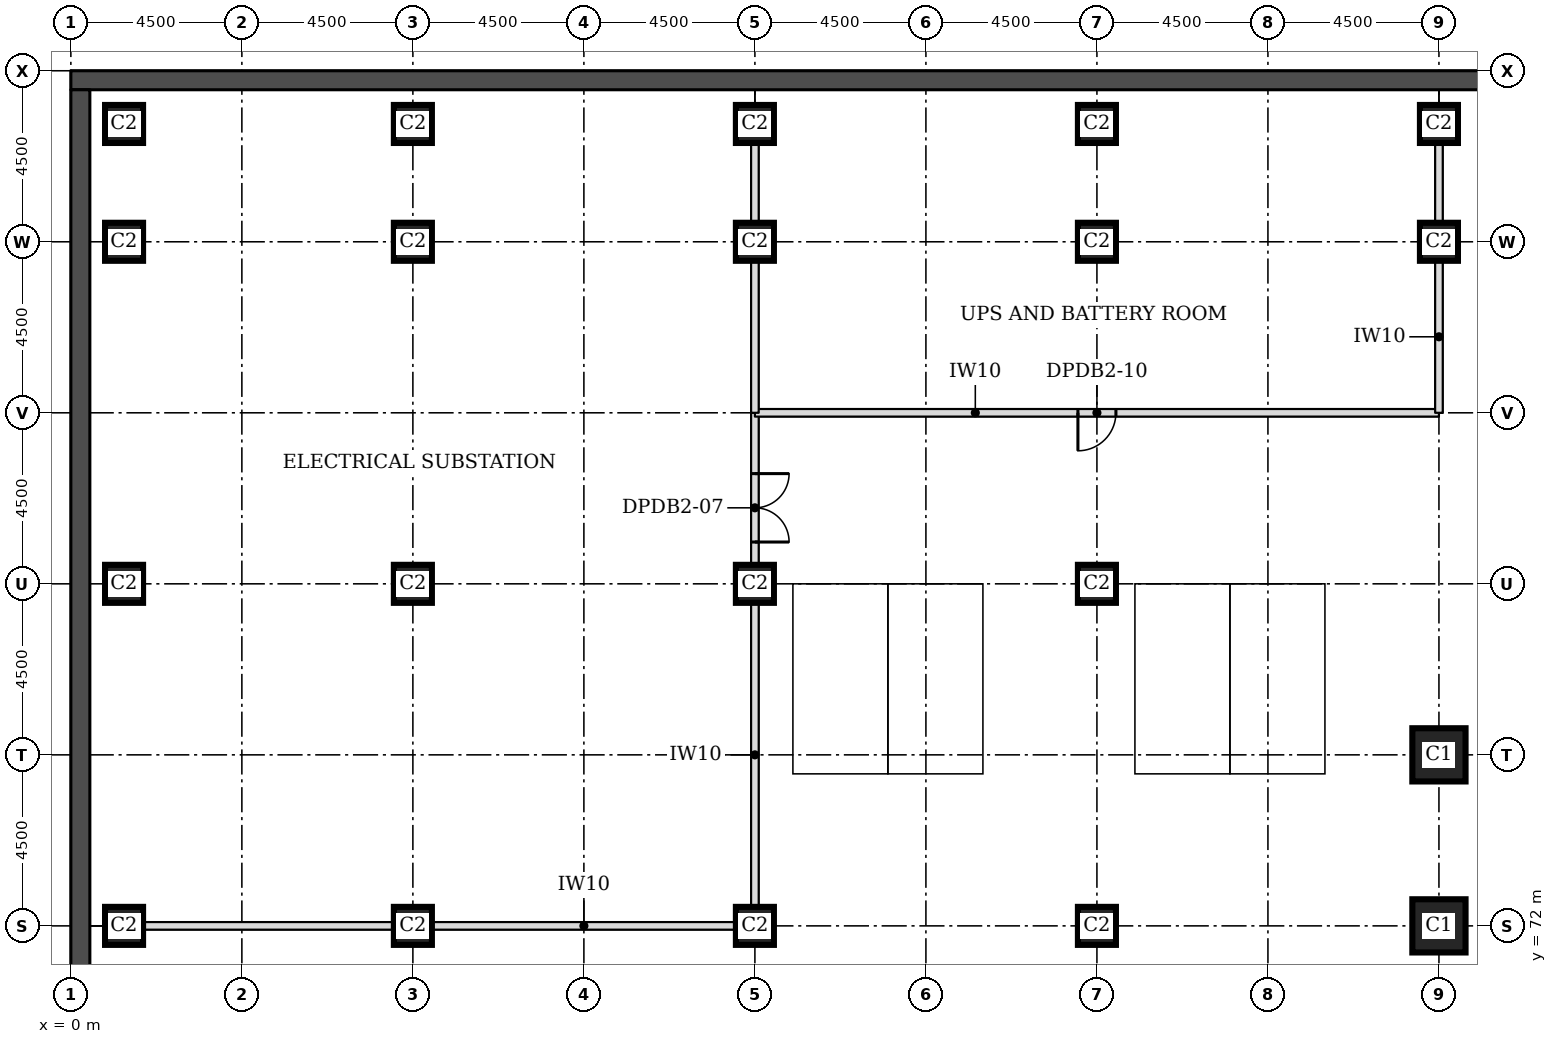
"""IFC4 building model, lengths in metres.
Left out: names, types, materials, properties, quantities, classifications, styles, units other than length and angle.
Written with IfcOpenShell. Run it as: python <this file> out.ifc"""

import sys

from ifc_helpers import new_model, si_unit, direction, frame, frame_2d, origin, origin_2d, place, context, subcontext, project, spatial, rectangle, extrude, element, fill, save


model = new_model("IFC4")
c1 = context("Model", 3, precision=1e-05, world=origin(), true_north=direction((0.0, 1.0)))
c2 = subcontext(c1, "Body", "Model", "MODEL_VIEW")
j1 = project(units=[si_unit("LENGTHUNIT", "METRE"), si_unit("PLANEANGLEUNIT", "RADIAN")], contexts=[c1])
p1 = place(None, origin())
s1 = spatial("IfcSite", under=j1, at=p1, CompositionType="ELEMENT")
p2 = place(p1, origin())
s2 = spatial("IfcBuilding", under=s1, at=p2, CompositionType="ELEMENT")
p3 = place(p2, frame((0.0, 0.0, -9.0)))
s3 = spatial("IfcBuildingStorey", under=s2, at=p3, CompositionType="ELEMENT", Elevation=-9.0)
p4 = place(p3, frame((0.0, 94.25, -0.4), z_axis=(0.0, 0.0, 1.0), x_axis=(1.0, 0.0, 0.0)))
e1 = element("IfcWall", 1, at=p4, inside=s3, PredefinedType="SOLIDWALL", context=c2, shape_type="SweptSolid", body=[
    extrude(rectangle(XDim=99.0, YDim=0.5, at=frame_2d((49.5, 0.0))), origin(), (0.0, 0.0, 1.0), 4.5),
])
p5 = place(p3, frame((0.25, 0.5, -0.4), z_axis=(0.0, 0.0, 1.0), x_axis=(0.0, 1.0, 0.0)))
e2 = element("IfcWall", 2, at=p5, inside=s3, PredefinedType="SOLIDWALL", context=c2, shape_type="SweptSolid", body=[
    extrude(rectangle(XDim=93.5, YDim=0.5, at=frame_2d((46.75, 0.0))), origin(), (0.0, 0.0, 1.0), 4.5),
])
for number, where, z_axis, x_axis in (
    (3, (36.0, 72.0, 0.0), (0.0, 0.0, 1.0), (1.0, 0.0, 0.0)),
    (4, (36.0, 76.5, 0.0), (0.0, 0.0, 1.0), (1.0, 0.0, 0.0)),
):
    element("IfcColumn", number, at=place(p3, frame(where, z_axis=z_axis, x_axis=x_axis)), inside=s3, PredefinedType="COLUMN", context=c2, shape_type="SweptSolid", body=[
        extrude(rectangle(XDim=1.4, YDim=1.4, at=origin_2d()), origin(), (0.0, 0.0, 1.0), 4.5),
    ])
for number, where, z_axis, x_axis in (
    (5, (9.0, 72.0, -0.4), (0.0, 0.0, 1.0), (1.0, 0.0, 0.0)),
    (6, (9.0, 81.0, -0.4), (0.0, 0.0, 1.0), (1.0, 0.0, 0.0)),
    (7, (9.0, 90.0, -0.4), (0.0, 0.0, 1.0), (1.0, 0.0, 0.0)),
    (8, (18.0, 72.0, -0.4), (0.0, 0.0, 1.0), (1.0, 0.0, 0.0)),
    (9, (18.0, 81.0, -0.4), (0.0, 0.0, 1.0), (1.0, 0.0, 0.0)),
    (10, (18.0, 90.0, -0.4), (0.0, 0.0, 1.0), (1.0, 0.0, 0.0)),
    (11, (27.0, 72.0, -0.4), (0.0, 0.0, 1.0), (1.0, 0.0, 0.0)),
    (12, (27.0, 81.0, -0.4), (0.0, 0.0, 1.0), (1.0, 0.0, 0.0)),
    (13, (27.0, 90.0, -0.4), (0.0, 0.0, 1.0), (1.0, 0.0, 0.0)),
    (14, (36.0, 90.0, -0.4), (0.0, 0.0, 1.0), (1.0, 0.0, 0.0)),
    (15, (1.4, 72.0, -0.4), (0.0, 0.0, 1.0), (1.0, 0.0, 0.0)),
    (16, (1.4, 81.0, -0.4), (0.0, 0.0, 1.0), (1.0, 0.0, 0.0)),
    (17, (1.4, 90.0, -0.4), (0.0, 0.0, 1.0), (1.0, 0.0, 0.0)),
    (18, (1.4, 93.1, -0.4), (0.0, 0.0, 1.0), (1.0, 0.0, 0.0)),
    (19, (9.0, 93.1, -0.4), (0.0, 0.0, 1.0), (1.0, 0.0, 0.0)),
    (20, (18.0, 93.1, -0.4), (0.0, 0.0, 1.0), (1.0, 0.0, 0.0)),
    (21, (27.0, 93.1, -0.4), (0.0, 0.0, 1.0), (1.0, 0.0, 0.0)),
    (22, (36.0, 93.1, -0.4), (0.0, 0.0, 1.0), (1.0, 0.0, 0.0)),
):
    element("IfcColumn", number, at=place(p3, frame(where, z_axis=z_axis, x_axis=x_axis)), inside=s3, PredefinedType="COLUMN", context=c2, shape_type="SweptSolid", body=[
        extrude(rectangle(XDim=1.0, YDim=1.0, at=origin_2d()), origin(), (0.0, 0.0, 1.0), 4.9),
    ])
p6 = place(p3, frame((1.9, 72.0, 0.0), z_axis=(0.0, 0.0, 1.0), x_axis=(1.0, 0.0, 0.0)))
e23 = element("IfcWall", 23, at=p6, inside=s3, PredefinedType="PARTITIONING", context=c2, shape_type="SweptSolid", body=[
    extrude(rectangle(XDim=6.6, YDim=0.2, at=frame_2d((3.3, 0.0))), origin(), (0.0, 0.0, 1.0), 4.1),
])
for number, where, z_axis, x_axis in (
    (24, (9.5, 72.0, 0.0), (0.0, 0.0, 1.0), (1.0, 0.0, 0.0)),
    (25, (18.0, 72.5, 0.0), (0.0, 0.0, 1.0), (0.0, 1.0, 0.0)),
):
    element("IfcWall", number, at=place(p3, frame(where, z_axis=z_axis, x_axis=x_axis)), inside=s3, PredefinedType="PARTITIONING", context=c2, shape_type="SweptSolid", body=[
        extrude(rectangle(XDim=8.0, YDim=0.2, at=frame_2d((4.0, 0.0))), origin(), (0.0, 0.0, 1.0), 4.1),
    ])
p7 = place(p3, frame((18.0, 81.5, 0.0), z_axis=(0.0, 0.0, 1.0), x_axis=(0.0, 1.0, 0.0)))
e26 = element("IfcWall", 26, at=p7, inside=s3, PredefinedType="PARTITIONING", context=c2, shape_type="SweptSolid", body=[
    extrude(rectangle(XDim=4.0, YDim=0.2, at=frame_2d((2.0, 0.0))), origin(), (0.0, 0.0, 1.0), 4.1),
])
p8 = place(p7, frame((0.6, 0.0, 0.0)))
e27 = element("IfcOpeningElement", 27, at=p8, cuts=e26, PredefinedType="OPENING", context=c2, shape_type="SweptSolid", body=[
    extrude(rectangle(XDim=1.8, YDim=2.1, at=frame_2d((0.9, 1.05))), frame((0.0, 0.11, 0.0), z_axis=(0.0, -1.0, 0.0), x_axis=(1.0, 0.0, 0.0)), (0.0, 0.0, 1.0), 0.22),
])
p9 = place(p3, frame((18.0, 85.5, 0.0), z_axis=(0.0, 0.0, 1.0), x_axis=(1.0, 0.0, 0.0)))
e28 = element("IfcWall", 28, at=p9, inside=s3, PredefinedType="PARTITIONING", context=c2, shape_type="SweptSolid", body=[
    extrude(rectangle(XDim=18.0, YDim=0.2, at=frame_2d((9.0, 0.0))), origin(), (0.0, 0.0, 1.0), 4.1),
])
p10 = place(p9, frame((8.5, 0.0, 0.0)))
e29 = element("IfcOpeningElement", 29, at=p10, cuts=e28, PredefinedType="OPENING", context=c2, shape_type="SweptSolid", body=[
    extrude(rectangle(XDim=1.0, YDim=2.1, at=frame_2d((0.5, 1.05))), frame((0.0, 0.11, 0.0), z_axis=(0.0, -1.0, 0.0), x_axis=(1.0, 0.0, 0.0)), (0.0, 0.0, 1.0), 0.22),
])
p11 = place(p3, frame((18.0, 85.5, 0.0), z_axis=(0.0, 0.0, 1.0), x_axis=(0.0, 1.0, 0.0)))
e30 = element("IfcWall", 30, at=p11, inside=s3, PredefinedType="PARTITIONING", context=c2, shape_type="SweptSolid", body=[
    extrude(rectangle(XDim=4.0, YDim=0.2, at=frame_2d((2.0, 0.0))), origin(), (0.0, 0.0, 1.0), 4.1),
])
p12 = place(p3, frame((18.0, 90.5, 0.0), z_axis=(0.0, 0.0, 1.0), x_axis=(0.0, 1.0, 0.0)))
e31 = element("IfcWall", 31, at=p12, inside=s3, PredefinedType="PARTITIONING", context=c2, shape_type="SweptSolid", body=[
    extrude(rectangle(XDim=2.1, YDim=0.2, at=frame_2d((1.05, 0.0))), origin(), (0.0, 0.0, 1.0), 4.1),
])
p13 = place(p3, frame((36.0, 85.5, 0.0), z_axis=(0.0, 0.0, 1.0), x_axis=(0.0, 1.0, 0.0)))
e32 = element("IfcWall", 32, at=p13, inside=s3, PredefinedType="PARTITIONING", context=c2, shape_type="SweptSolid", body=[
    extrude(rectangle(XDim=4.0, YDim=0.2, at=frame_2d((2.0, 0.0))), origin(), (0.0, 0.0, 1.0), 4.1),
])
p14 = place(p3, frame((36.0, 90.5, 0.0), z_axis=(0.0, 0.0, 1.0), x_axis=(0.0, 1.0, 0.0)))
e33 = element("IfcWall", 33, at=p14, inside=s3, PredefinedType="PARTITIONING", context=c2, shape_type="SweptSolid", body=[
    extrude(rectangle(XDim=2.1, YDim=0.2, at=frame_2d((1.05, 0.0))), origin(), (0.0, 0.0, 1.0), 4.1),
])
p15 = place(p8, frame((1.8, 0.0, 0.0), z_axis=(0.0, 0.0, 1.0), x_axis=(-1.0, 0.0, 0.0)))
e34 = element("IfcDoor", 34, at=p15, inside=s3, OperationType="DOUBLE_DOOR_SINGLE_SWING", PredefinedType="DOOR", context=c2, shape_type="SweptSolid", body=[
    extrude(rectangle(XDim=1.8, YDim=2.1, at=frame_2d((0.9, 1.05))), frame((0.0, 0.025, 0.0), z_axis=(0.0, -1.0, 0.0), x_axis=(1.0, 0.0, 0.0)), (0.0, 0.0, 1.0), 0.05),
])
fill(e27, e34)
p16 = place(p10, frame((1.0, 0.0, 0.0), z_axis=(0.0, 0.0, 1.0), x_axis=(-1.0, 0.0, 0.0)))
e35 = element("IfcDoor", 35, at=p16, inside=s3, OperationType="SINGLE_SWING_RIGHT", PredefinedType="DOOR", context=c2, shape_type="SweptSolid", body=[
    extrude(rectangle(XDim=1.0, YDim=2.1, at=frame_2d((0.5, 1.05))), frame((0.0, 0.025, 0.0), z_axis=(0.0, -1.0, 0.0), x_axis=(1.0, 0.0, 0.0)), (0.0, 0.0, 1.0), 0.05),
])
fill(e29, e35)
save(model, sys.argv[1])
